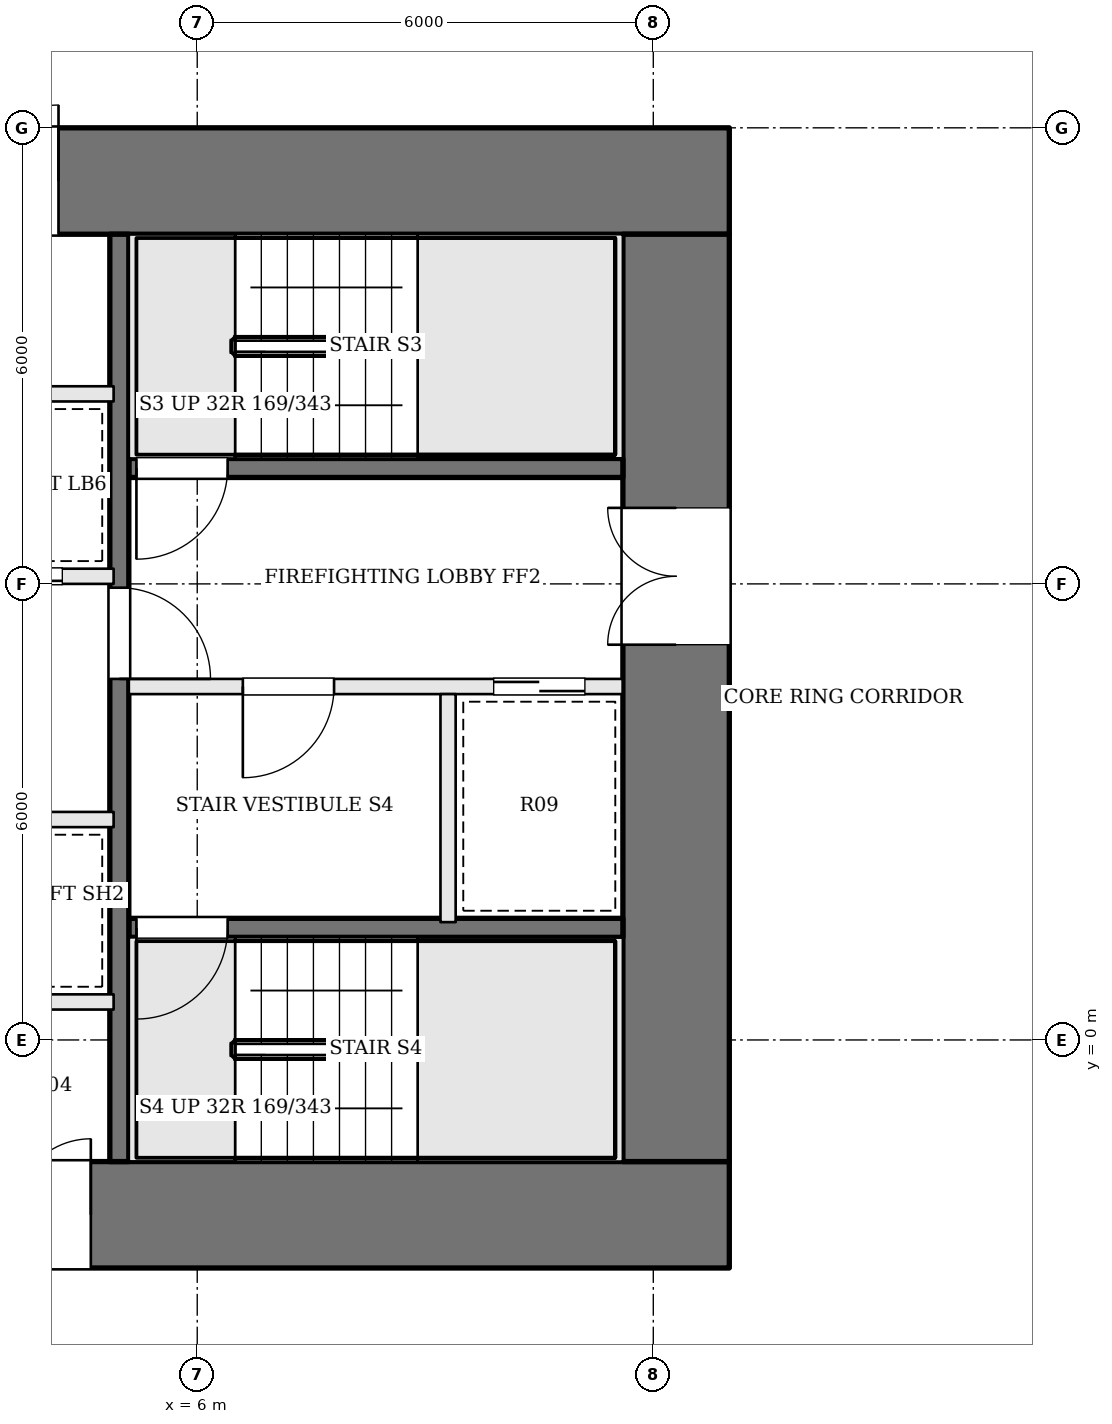
"""IFC4 building model, lengths in metres.
Left out: names, types, materials, properties, quantities, classifications, styles, units other than length and angle.
Written with IfcOpenShell. Run it as: python <this file> out.ifc"""

import sys

from ifc_helpers import new_model, si_unit, direction, frame, frame_2d, origin, place, context, subcontext, project, spatial, rectangle, extrude, element, fill, save


model = new_model("IFC4")
c1 = context("Model", 3, precision=1e-05, world=origin(), true_north=direction((0.0, 1.0)))
c2 = subcontext(c1, "Body", "Model", "MODEL_VIEW")
j1 = project(units=[si_unit("LENGTHUNIT", "METRE"), si_unit("PLANEANGLEUNIT", "RADIAN")], contexts=[c1])
p1 = place(None, origin())
s1 = spatial("IfcSite", under=j1, at=p1, CompositionType="ELEMENT")
p2 = place(p1, origin())
s2 = spatial("IfcBuilding", under=s1, at=p2, CompositionType="ELEMENT")
p3 = place(p2, frame((0.0, 0.0, 22.8)))
s3 = spatial("IfcBuildingStorey", under=s2, at=p3, CompositionType="ELEMENT", Elevation=22.8)
p4 = place(p3, frame((-13.0, 11.3, 0.0), z_axis=(0.0, 0.0, 1.0), x_axis=(1.0, 0.0, 0.0)))
e1 = element("IfcWall", 1, at=p4, inside=s3, PredefinedType="SHEAR", context=c2, shape_type="SweptSolid", body=[
    extrude(rectangle(XDim=26.0, YDim=1.4, at=frame_2d((13.0, 0.0))), origin(), (0.0, 0.0, 1.0), 5.4),
])
p5 = place(p4, frame((8.575, 0.0, 0.0)))
e2 = element("IfcOpeningElement", 2, at=p5, cuts=e1, PredefinedType="OPENING", context=c2, shape_type="SweptSolid", body=[
    extrude(rectangle(XDim=0.7, YDim=2.1, at=frame_2d((0.35, 1.05))), frame((0.0, 0.71, 0.0), z_axis=(0.0, -1.0, 0.0), x_axis=(1.0, 0.0, 0.0)), (0.0, 0.0, 1.0), 1.42),
])
p6 = place(p4, frame((10.875, 0.0, 0.0)))
e3 = element("IfcOpeningElement", 3, at=p6, cuts=e1, PredefinedType="OPENING", context=c2, shape_type="SweptSolid", body=[
    extrude(rectangle(XDim=1.0, YDim=2.1, at=frame_2d((0.5, 1.05))), frame((0.0, 0.71, 0.0), z_axis=(0.0, -1.0, 0.0), x_axis=(1.0, 0.0, 0.0)), (0.0, 0.0, 1.0), 1.42),
])
p7 = place(p4, frame((13.875, 0.0, 0.0)))
e4 = element("IfcOpeningElement", 4, at=p7, cuts=e1, PredefinedType="OPENING", context=c2, shape_type="SweptSolid", body=[
    extrude(rectangle(XDim=0.7, YDim=2.1, at=frame_2d((0.35, 1.05))), frame((0.0, 0.71, 0.0), z_axis=(0.0, -1.0, 0.0), x_axis=(1.0, 0.0, 0.0)), (0.0, 0.0, 1.0), 1.42),
])
p8 = place(p4, frame((16.175, 0.0, 0.0)))
e5 = element("IfcOpeningElement", 5, at=p8, cuts=e1, PredefinedType="OPENING", context=c2, shape_type="SweptSolid", body=[
    extrude(rectangle(XDim=1.0, YDim=2.1, at=frame_2d((0.5, 1.05))), frame((0.0, 0.71, 0.0), z_axis=(0.0, -1.0, 0.0), x_axis=(1.0, 0.0, 0.0)), (0.0, 0.0, 1.0), 1.42),
])
p9 = place(p3, frame((-13.0, -2.3, 0.0), z_axis=(0.0, 0.0, 1.0), x_axis=(1.0, 0.0, 0.0)))
e6 = element("IfcWall", 6, at=p9, inside=s3, PredefinedType="SHEAR", context=c2, shape_type="SweptSolid", body=[
    extrude(rectangle(XDim=26.0, YDim=1.4, at=frame_2d((13.0, 0.0))), origin(), (0.0, 0.0, 1.0), 5.4),
])
p10 = place(p9, frame((9.3, 0.0, 0.0)))
e7 = element("IfcOpeningElement", 7, at=p10, cuts=e6, PredefinedType="OPENING", context=c2, shape_type="SweptSolid", body=[
    extrude(rectangle(XDim=0.9, YDim=2.1, at=frame_2d((0.45, 1.05))), frame((0.0, 0.71, 0.0), z_axis=(0.0, -1.0, 0.0), x_axis=(1.0, 0.0, 0.0)), (0.0, 0.0, 1.0), 1.42),
])
p11 = place(p9, frame((12.5, 0.0, 0.0)))
e8 = element("IfcOpeningElement", 8, at=p11, cuts=e6, PredefinedType="OPENING", context=c2, shape_type="SweptSolid", body=[
    extrude(rectangle(XDim=0.9, YDim=2.1, at=frame_2d((0.45, 1.05))), frame((0.0, 0.71, 0.0), z_axis=(0.0, -1.0, 0.0), x_axis=(1.0, 0.0, 0.0)), (0.0, 0.0, 1.0), 1.42),
])
p12 = place(p9, frame((14.9, 0.0, 0.0)))
e9 = element("IfcOpeningElement", 9, at=p12, cuts=e6, PredefinedType="OPENING", context=c2, shape_type="SweptSolid", body=[
    extrude(rectangle(XDim=1.0, YDim=2.1, at=frame_2d((0.5, 1.05))), frame((0.0, 0.71, 0.0), z_axis=(0.0, -1.0, 0.0), x_axis=(1.0, 0.0, 0.0)), (0.0, 0.0, 1.0), 1.42),
])
p13 = place(p9, frame((16.6, 0.0, 0.0)))
e10 = element("IfcOpeningElement", 10, at=p13, cuts=e6, PredefinedType="OPENING", context=c2, shape_type="SweptSolid", body=[
    extrude(rectangle(XDim=1.0, YDim=2.1, at=frame_2d((0.5, 1.05))), frame((0.0, 0.71, 0.0), z_axis=(0.0, -1.0, 0.0), x_axis=(1.0, 0.0, 0.0)), (0.0, 0.0, 1.0), 1.42),
])
p14 = place(p3, frame((12.3, -1.6, 0.0), z_axis=(0.0, 0.0, 1.0), x_axis=(0.0, 1.0, 0.0)))
e11 = element("IfcWall", 11, at=p14, inside=s3, PredefinedType="SHEAR", context=c2, shape_type="SweptSolid", body=[
    extrude(rectangle(XDim=12.2, YDim=1.4, at=frame_2d((6.1, 0.0))), origin(), (0.0, 0.0, 1.0), 5.4),
])
p15 = place(p14, frame((6.8, 0.0, 0.0)))
e12 = element("IfcOpeningElement", 12, at=p15, cuts=e11, PredefinedType="OPENING", context=c2, shape_type="SweptSolid", body=[
    extrude(rectangle(XDim=1.8, YDim=2.1, at=frame_2d((0.9, 1.05))), frame((0.0, 0.71, 0.0), z_axis=(0.0, -1.0, 0.0), x_axis=(1.0, 0.0, 0.0)), (0.0, 0.0, 1.0), 1.42),
])
p16 = place(p3, frame((11.6, 7.525, 0.0), z_axis=(0.0, 0.0, 1.0), x_axis=(-1.0, 0.0, 0.0)))
e13 = element("IfcWall", 13, at=p16, inside=s3, PredefinedType="SOLIDWALL", context=c2, shape_type="SweptSolid", body=[
    extrude(rectangle(XDim=6.5, YDim=0.25, at=frame_2d((3.25, 0.0))), origin(), (0.0, 0.0, 1.0), 5.15),
])
p17 = place(p16, frame((5.2, 0.0, 0.0)))
e14 = element("IfcOpeningElement", 14, at=p17, cuts=e13, PredefinedType="OPENING", context=c2, shape_type="SweptSolid", body=[
    extrude(rectangle(XDim=1.2, YDim=2.1, at=frame_2d((0.6, 1.05))), frame((0.0, 0.135, 0.0), z_axis=(0.0, -1.0, 0.0), x_axis=(1.0, 0.0, 0.0)), (0.0, 0.0, 1.0), 0.27),
])
p18 = place(p3, frame((11.6, 4.65, 0.0), z_axis=(0.0, 0.0, 1.0), x_axis=(-1.0, 0.0, 0.0)))
e15 = element("IfcWall", 15, at=p18, inside=s3, PredefinedType="SOLIDWALL", context=c2, shape_type="SweptSolid", body=[
    extrude(rectangle(XDim=6.5, YDim=0.2, at=frame_2d((3.25, 0.0))), origin(), (0.0, 0.0, 1.0), 5.15),
])
p19 = place(p18, frame((3.8, 0.0, 0.0)))
e16 = element("IfcOpeningElement", 16, at=p19, cuts=e15, PredefinedType="OPENING", context=c2, shape_type="SweptSolid", body=[
    extrude(rectangle(XDim=1.2, YDim=2.1, at=frame_2d((0.6, 1.05))), frame((0.0, 0.11, 0.0), z_axis=(0.0, -1.0, 0.0), x_axis=(1.0, 0.0, 0.0)), (0.0, 0.0, 1.0), 0.22),
])
p20 = place(p18, frame((0.5, 0.0, 0.0)))
e17 = element("IfcOpeningElement", 17, at=p20, cuts=e15, PredefinedType="OPENING", context=c2, shape_type="SweptSolid", body=[
    extrude(rectangle(XDim=1.2, YDim=2.1, at=frame_2d((0.6, 1.05))), frame((0.0, 0.11, 0.0), z_axis=(0.0, -1.0, 0.0), x_axis=(1.0, 0.0, 0.0)), (0.0, 0.0, 1.0), 0.22),
])
p21 = place(p3, frame((11.6, 1.475, 0.0), z_axis=(0.0, 0.0, 1.0), x_axis=(-1.0, 0.0, 0.0)))
e18 = element("IfcWall", 18, at=p21, inside=s3, PredefinedType="SOLIDWALL", context=c2, shape_type="SweptSolid", body=[
    extrude(rectangle(XDim=6.5, YDim=0.25, at=frame_2d((3.25, 0.0))), origin(), (0.0, 0.0, 1.0), 5.15),
])
p22 = place(p21, frame((5.2, 0.0, 0.0)))
e19 = element("IfcOpeningElement", 19, at=p22, cuts=e18, PredefinedType="OPENING", context=c2, shape_type="SweptSolid", body=[
    extrude(rectangle(XDim=1.2, YDim=2.1, at=frame_2d((0.6, 1.05))), frame((0.0, 0.135, 0.0), z_axis=(0.0, -1.0, 0.0), x_axis=(1.0, 0.0, 0.0)), (0.0, 0.0, 1.0), 0.27),
])
p23 = place(p3, frame((9.3, 4.55, 0.0), z_axis=(0.0, 0.0, 1.0), x_axis=(0.0, -1.0, 0.0)))
e20 = element("IfcWall", 20, at=p23, inside=s3, PredefinedType="SOLIDWALL", context=c2, shape_type="SweptSolid", body=[
    extrude(rectangle(XDim=3.0, YDim=0.2, at=frame_2d((1.5, 0.0))), origin(), (0.0, 0.0, 1.0), 5.15),
])
p24 = place(p3, frame((4.975, 10.6, 0.0), z_axis=(0.0, 0.0, 1.0), x_axis=(0.0, -1.0, 0.0)))
e21 = element("IfcWall", 21, at=p24, inside=s3, PredefinedType="SOLIDWALL", context=c2, shape_type="SweptSolid", body=[
    extrude(rectangle(XDim=12.2, YDim=0.25, at=frame_2d((6.1, 0.0))), origin(), (0.0, 0.0, 1.0), 5.15),
])
p25 = place(p24, frame((4.65, 0.0, 0.0)))
e22 = element("IfcOpeningElement", 22, at=p25, cuts=e21, PredefinedType="OPENING", context=c2, shape_type="SweptSolid", body=[
    extrude(rectangle(XDim=1.2, YDim=2.1, at=frame_2d((0.6, 1.05))), frame((0.0, 0.135, 0.0), z_axis=(0.0, -1.0, 0.0), x_axis=(1.0, 0.0, 0.0)), (0.0, 0.0, 1.0), 0.27),
])
p26 = place(p3, frame((-4.9, 0.5, 0.0), z_axis=(0.0, 0.0, 1.0), x_axis=(1.0, 0.0, 0.0)))
e23 = element("IfcWall", 23, at=p26, inside=s3, PredefinedType="SOLIDWALL", context=c2, shape_type="SweptSolid", body=[
    extrude(rectangle(XDim=9.8, YDim=0.2, at=frame_2d((4.9, 0.0))), origin(), (0.0, 0.0, 1.0), 5.15),
])
p27 = place(p3, frame((-4.9, 2.9, 0.0), z_axis=(0.0, 0.0, 1.0), x_axis=(1.0, 0.0, 0.0)))
e24 = element("IfcWall", 24, at=p27, inside=s3, PredefinedType="SOLIDWALL", context=c2, shape_type="SweptSolid", body=[
    extrude(rectangle(XDim=9.8, YDim=0.2, at=frame_2d((4.9, 0.0))), origin(), (0.0, 0.0, 1.0), 5.15),
])
p28 = place(p27, frame((0.675, 0.0, 0.0)))
e25 = element("IfcOpeningElement", 25, at=p28, cuts=e24, PredefinedType="OPENING", context=c2, shape_type="SweptSolid", body=[
    extrude(rectangle(XDim=1.1, YDim=2.1, at=frame_2d((0.55, 1.05))), frame((0.0, 0.11, 0.0), z_axis=(0.0, -1.0, 0.0), x_axis=(1.0, 0.0, 0.0)), (0.0, 0.0, 1.0), 0.22),
])
p29 = place(p27, frame((3.125, 0.0, 0.0)))
e26 = element("IfcOpeningElement", 26, at=p29, cuts=e24, PredefinedType="OPENING", context=c2, shape_type="SweptSolid", body=[
    extrude(rectangle(XDim=1.1, YDim=2.1, at=frame_2d((0.55, 1.05))), frame((0.0, 0.11, 0.0), z_axis=(0.0, -1.0, 0.0), x_axis=(1.0, 0.0, 0.0)), (0.0, 0.0, 1.0), 0.22),
])
p30 = place(p3, frame((-4.9, 6.1, 0.0), z_axis=(0.0, 0.0, 1.0), x_axis=(1.0, 0.0, 0.0)))
e27 = element("IfcWall", 27, at=p30, inside=s3, PredefinedType="SOLIDWALL", context=c2, shape_type="SweptSolid", body=[
    extrude(rectangle(XDim=9.8, YDim=0.2, at=frame_2d((4.9, 0.0))), origin(), (0.0, 0.0, 1.0), 5.15),
])
p31 = place(p30, frame((0.675, 0.0, 0.0)))
e28 = element("IfcOpeningElement", 28, at=p31, cuts=e27, PredefinedType="OPENING", context=c2, shape_type="SweptSolid", body=[
    extrude(rectangle(XDim=1.1, YDim=2.1, at=frame_2d((0.55, 1.05))), frame((0.0, 0.11, 0.0), z_axis=(0.0, -1.0, 0.0), x_axis=(1.0, 0.0, 0.0)), (0.0, 0.0, 1.0), 0.22),
])
p32 = place(p30, frame((3.125, 0.0, 0.0)))
e29 = element("IfcOpeningElement", 29, at=p32, cuts=e27, PredefinedType="OPENING", context=c2, shape_type="SweptSolid", body=[
    extrude(rectangle(XDim=1.1, YDim=2.1, at=frame_2d((0.55, 1.05))), frame((0.0, 0.11, 0.0), z_axis=(0.0, -1.0, 0.0), x_axis=(1.0, 0.0, 0.0)), (0.0, 0.0, 1.0), 0.22),
])
p33 = place(p30, frame((5.575, 0.0, 0.0)))
e30 = element("IfcOpeningElement", 30, at=p33, cuts=e27, PredefinedType="OPENING", context=c2, shape_type="SweptSolid", body=[
    extrude(rectangle(XDim=1.1, YDim=2.1, at=frame_2d((0.55, 1.05))), frame((0.0, 0.11, 0.0), z_axis=(0.0, -1.0, 0.0), x_axis=(1.0, 0.0, 0.0)), (0.0, 0.0, 1.0), 0.22),
])
p34 = place(p30, frame((8.025, 0.0, 0.0)))
e31 = element("IfcOpeningElement", 31, at=p34, cuts=e27, PredefinedType="OPENING", context=c2, shape_type="SweptSolid", body=[
    extrude(rectangle(XDim=1.1, YDim=2.1, at=frame_2d((0.55, 1.05))), frame((0.0, 0.11, 0.0), z_axis=(0.0, -1.0, 0.0), x_axis=(1.0, 0.0, 0.0)), (0.0, 0.0, 1.0), 0.22),
])
p35 = place(p3, frame((-4.9, 8.5, 0.0), z_axis=(0.0, 0.0, 1.0), x_axis=(1.0, 0.0, 0.0)))
e32 = element("IfcWall", 32, at=p35, inside=s3, PredefinedType="SOLIDWALL", context=c2, shape_type="SweptSolid", body=[
    extrude(rectangle(XDim=9.8, YDim=0.2, at=frame_2d((4.9, 0.0))), origin(), (0.0, 0.0, 1.0), 5.15),
])
p36 = place(p15, origin())
e33 = element("IfcDoor", 33, at=p36, inside=s3, OperationType="DOUBLE_DOOR_SINGLE_SWING", PredefinedType="DOOR", context=c2, shape_type="SweptSolid", body=[
    extrude(rectangle(XDim=1.8, YDim=2.1, at=frame_2d((0.9, 1.05))), frame((0.0, 0.025, 0.0), z_axis=(0.0, -1.0, 0.0), x_axis=(1.0, 0.0, 0.0)), (0.0, 0.0, 1.0), 0.05),
])
fill(e12, e33)
p37 = place(p25, origin())
e34 = element("IfcDoor", 34, at=p37, inside=s3, OperationType="SINGLE_SWING_RIGHT", PredefinedType="DOOR", context=c2, shape_type="SweptSolid", body=[
    extrude(rectangle(XDim=1.2, YDim=2.1, at=frame_2d((0.6, 1.05))), frame((0.0, 0.025, 0.0), z_axis=(0.0, -1.0, 0.0), x_axis=(1.0, 0.0, 0.0)), (0.0, 0.0, 1.0), 0.05),
])
fill(e22, e34)
p38 = place(p19, origin())
e35 = element("IfcDoor", 35, at=p38, inside=s3, OperationType="SINGLE_SWING_RIGHT", PredefinedType="DOOR", context=c2, shape_type="SweptSolid", body=[
    extrude(rectangle(XDim=1.2, YDim=2.1, at=frame_2d((0.6, 1.05))), frame((0.0, 0.025, 0.0), z_axis=(0.0, -1.0, 0.0), x_axis=(1.0, 0.0, 0.0)), (0.0, 0.0, 1.0), 0.05),
])
fill(e16, e35)
p39 = place(p17, origin())
e36 = element("IfcDoor", 36, at=p39, inside=s3, OperationType="SINGLE_SWING_RIGHT", PredefinedType="DOOR", context=c2, shape_type="SweptSolid", body=[
    extrude(rectangle(XDim=1.2, YDim=2.1, at=frame_2d((0.6, 1.05))), frame((0.0, 0.025, 0.0), z_axis=(0.0, -1.0, 0.0), x_axis=(1.0, 0.0, 0.0)), (0.0, 0.0, 1.0), 0.05),
])
fill(e14, e36)
p40 = place(p22, origin())
e37 = element("IfcDoor", 37, at=p40, inside=s3, OperationType="SINGLE_SWING_RIGHT", PredefinedType="DOOR", context=c2, shape_type="SweptSolid", body=[
    extrude(rectangle(XDim=1.2, YDim=2.1, at=frame_2d((0.6, 1.05))), frame((0.0, 0.025, 0.0), z_axis=(0.0, -1.0, 0.0), x_axis=(1.0, 0.0, 0.0)), (0.0, 0.0, 1.0), 0.05),
])
fill(e19, e37)
p41 = place(p20, origin())
e38 = element("IfcDoor", 38, at=p41, inside=s3, OperationType="SLIDING_TO_RIGHT", PredefinedType="DOOR", context=c2, shape_type="SweptSolid", body=[
    extrude(rectangle(XDim=1.2, YDim=2.1, at=frame_2d((0.6, 1.05))), frame((0.0, 0.025, 0.0), z_axis=(0.0, -1.0, 0.0), x_axis=(1.0, 0.0, 0.0)), (0.0, 0.0, 1.0), 0.05),
])
fill(e17, e38)
p42 = place(p34, origin())
e39 = element("IfcDoor", 39, at=p42, inside=s3, OperationType="SLIDING_TO_LEFT", PredefinedType="DOOR", context=c2, shape_type="SweptSolid", body=[
    extrude(rectangle(XDim=1.1, YDim=2.1, at=frame_2d((0.55, 1.05))), frame((0.0, 0.025, 0.0), z_axis=(0.0, -1.0, 0.0), x_axis=(1.0, 0.0, 0.0)), (0.0, 0.0, 1.0), 0.05),
])
fill(e31, e39)
p43 = place(p13, origin())
e40 = element("IfcDoor", 40, at=p43, inside=s3, OperationType="SINGLE_SWING_RIGHT", PredefinedType="DOOR", context=c2, shape_type="SweptSolid", body=[
    extrude(rectangle(XDim=1.0, YDim=2.1, at=frame_2d((0.5, 1.05))), frame((0.0, 0.025, 0.0), z_axis=(0.0, -1.0, 0.0), x_axis=(1.0, 0.0, 0.0)), (0.0, 0.0, 1.0), 0.05),
])
fill(e10, e40)
p44 = place(p8, origin())
e41 = element("IfcDoor", 41, at=p44, inside=s3, OperationType="SINGLE_SWING_RIGHT", PredefinedType="DOOR", context=c2, shape_type="SweptSolid", body=[
    extrude(rectangle(XDim=1.0, YDim=2.1, at=frame_2d((0.5, 1.05))), frame((0.0, 0.025, 0.0), z_axis=(0.0, -1.0, 0.0), x_axis=(1.0, 0.0, 0.0)), (0.0, 0.0, 1.0), 0.05),
])
fill(e5, e41)
save(model, sys.argv[1])
